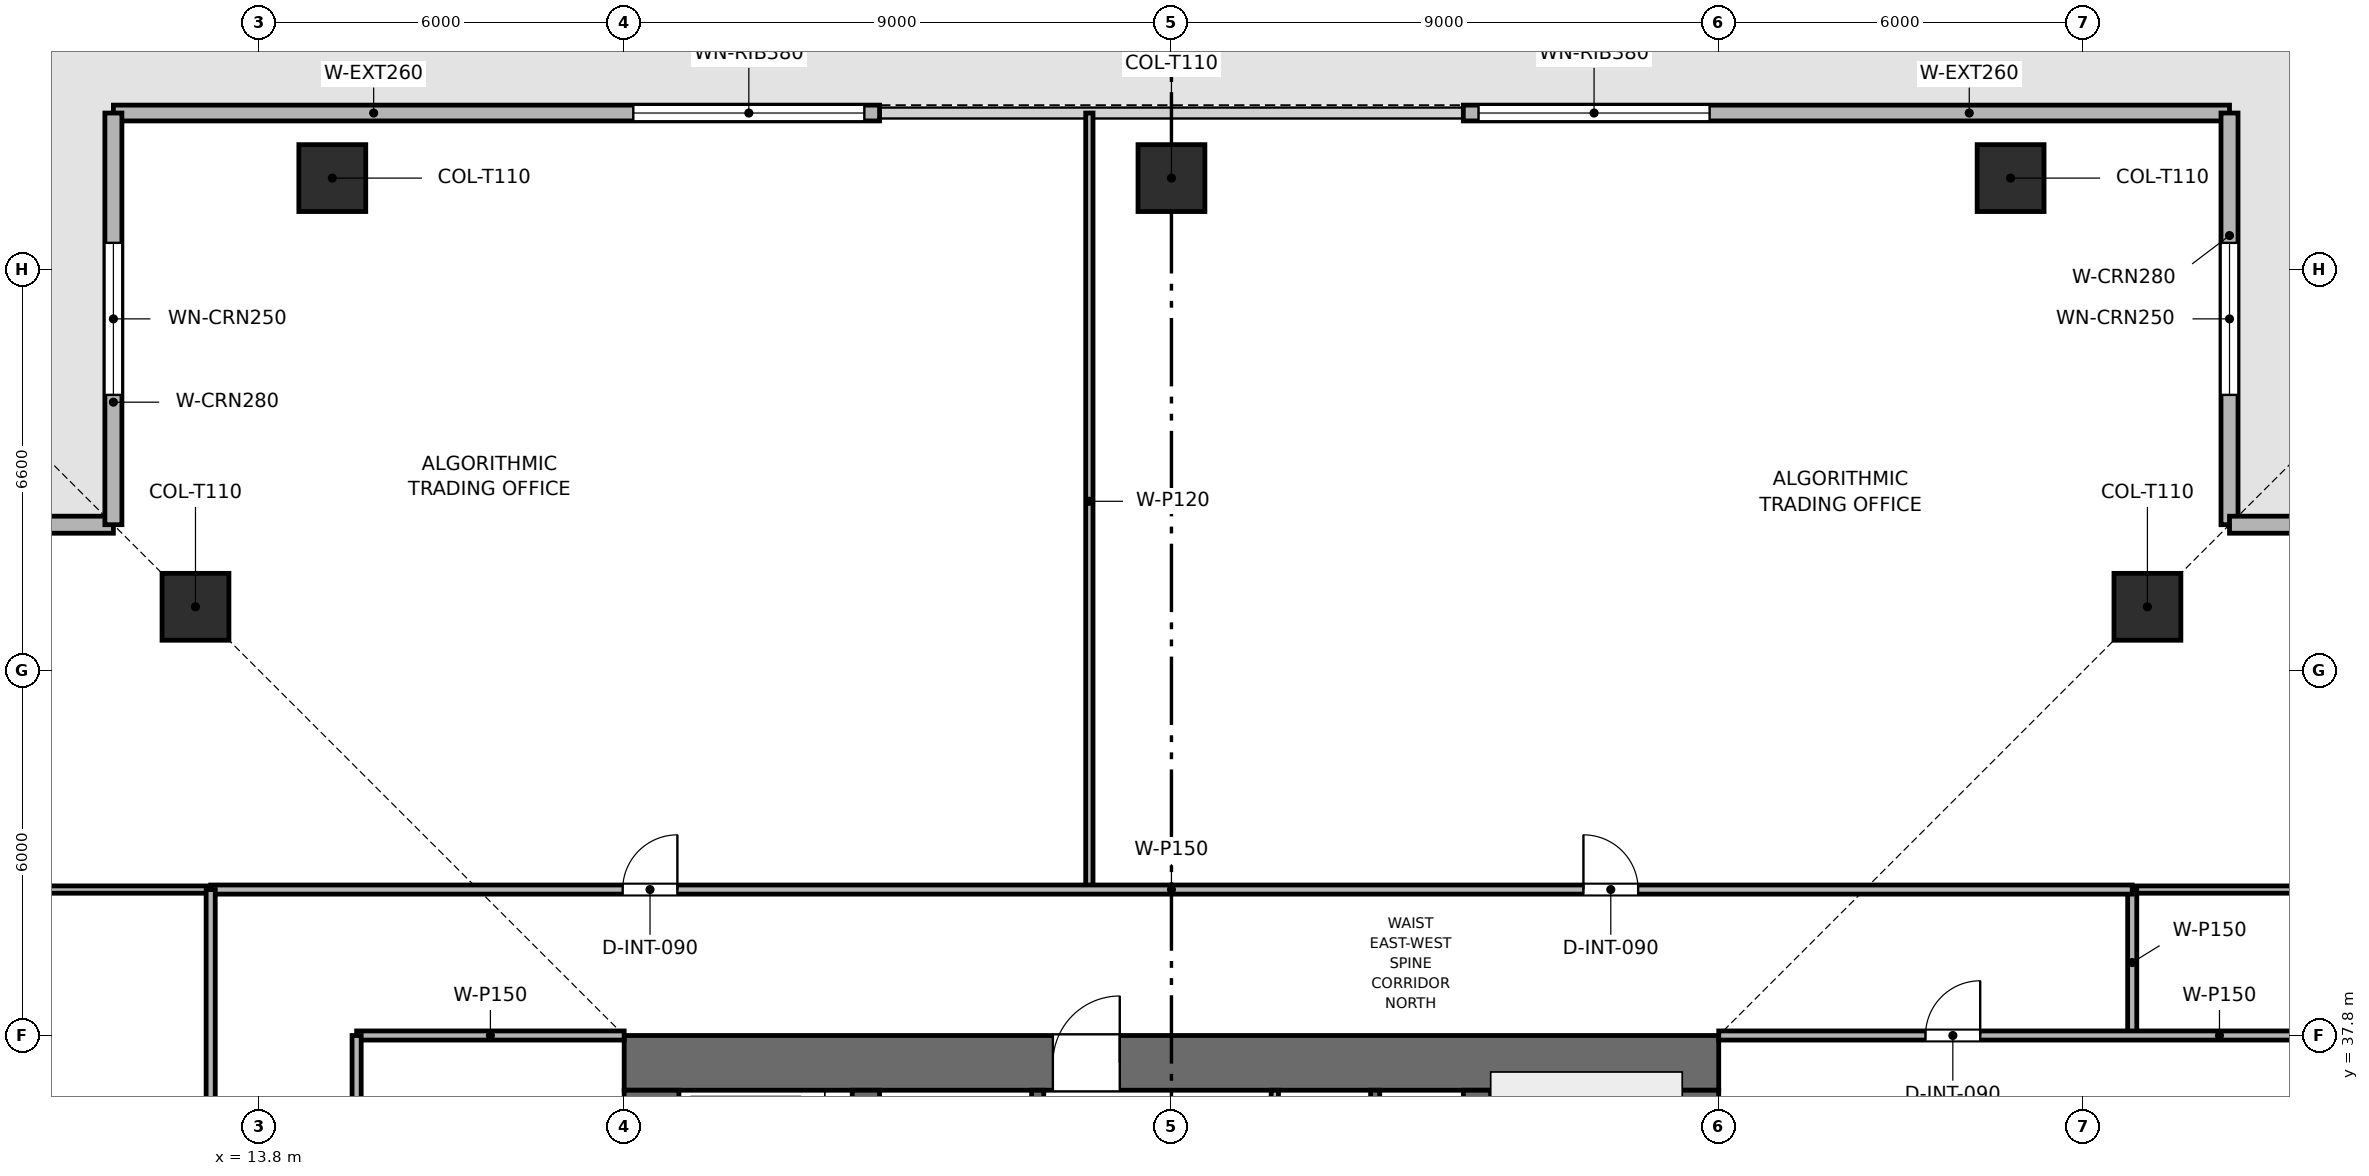
"""IFC4 building model, lengths in metres.
Left out: names, types, materials, properties, quantities, classifications, styles, units other than length and angle.
Written with IfcOpenShell. Run it as: python <this file> out.ifc"""

import sys

from ifc_helpers import new_model, si_unit, direction, frame, frame_2d, origin, origin_2d, place, context, subcontext, project, spatial, rectangle, extrude, element, fill, save


model = new_model("IFC4")
c1 = context("Model", 3, precision=1e-05, world=origin(), true_north=direction((0.0, 1.0)))
c2 = subcontext(c1, "Body", "Model", "MODEL_VIEW")
j1 = project(units=[si_unit("LENGTHUNIT", "METRE"), si_unit("PLANEANGLEUNIT", "RADIAN")], contexts=[c1])
p1 = place(None, origin())
s1 = spatial("IfcSite", under=j1, at=p1, CompositionType="ELEMENT")
p2 = place(p1, origin())
s2 = spatial("IfcBuilding", under=s1, at=p2, CompositionType="ELEMENT")
p3 = place(p2, frame((0.0, 0.0, 138.3)))
s3 = spatial("IfcBuildingStorey", under=s2, at=p3, CompositionType="ELEMENT", Elevation=138.3)
p4 = place(p3, frame((19.8, 37.35, 0.0), z_axis=(0.0, 0.0, 1.0), x_axis=(1.0, 0.0, 0.0)))
e1 = element("IfcWall", 1, at=p4, inside=s3, PredefinedType="SHEAR", context=c2, shape_type="SweptSolid", body=[
    extrude(rectangle(XDim=18.0, YDim=0.9, at=frame_2d((9.0, 0.0))), origin(), (0.0, 0.0, 1.0), 3.75),
])
p5 = place(p4, frame((7.05, 0.0, 0.0)))
e2 = element("IfcOpeningElement", 2, at=p5, cuts=e1, PredefinedType="OPENING", context=c2, shape_type="SweptSolid", body=[
    extrude(rectangle(XDim=1.1, YDim=2.15, at=frame_2d((0.55, 1.075))), frame((0.0, 0.46, 0.0), z_axis=(0.0, -1.0, 0.0), x_axis=(1.0, 0.0, 0.0)), (0.0, 0.0, 1.0), 0.92),
])
p6 = place(p3, frame((20.25, 20.7, 0.0), z_axis=(0.0, 0.0, 1.0), x_axis=(0.0, 1.0, 0.0)))
e3 = element("IfcWall", 3, at=p6, inside=s3, PredefinedType="SHEAR", context=c2, shape_type="SweptSolid", body=[
    extrude(rectangle(XDim=16.2, YDim=0.9, at=frame_2d((8.1, 0.0))), origin(), (0.0, 0.0, 1.0), 3.75),
])
p7 = place(p6, frame((10.1, 0.0, 0.0)))
e4 = element("IfcOpeningElement", 4, at=p7, cuts=e3, PredefinedType="OPENING", context=c2, shape_type="SweptSolid", body=[
    extrude(rectangle(XDim=1.1, YDim=2.15, at=frame_2d((0.55, 1.075))), frame((0.0, 0.46, 0.0), z_axis=(0.0, -1.0, 0.0), x_axis=(1.0, 0.0, 0.0)), (0.0, 0.0, 1.0), 0.92),
])
p8 = place(p3, frame((37.35, 20.7, 0.0), z_axis=(0.0, 0.0, 1.0), x_axis=(0.0, 1.0, 0.0)))
e5 = element("IfcWall", 5, at=p8, inside=s3, PredefinedType="SHEAR", context=c2, shape_type="SweptSolid", body=[
    extrude(rectangle(XDim=16.2, YDim=0.9, at=frame_2d((8.1, 0.0))), origin(), (0.0, 0.0, 1.0), 3.75),
])
p9 = place(p8, frame((4.6, 0.0, 0.0)))
e6 = element("IfcOpeningElement", 6, at=p9, cuts=e5, PredefinedType="OPENING", context=c2, shape_type="SweptSolid", body=[
    extrude(rectangle(XDim=1.1, YDim=2.15, at=frame_2d((0.55, 1.075))), frame((0.0, 0.46, 0.0), z_axis=(0.0, -1.0, 0.0), x_axis=(1.0, 0.0, 0.0)), (0.0, 0.0, 1.0), 0.92),
])
for number, where, z_axis, x_axis in (
    (7, (23.775, 20.7, 0.0), (0.0, 0.0, 1.0), (0.0, 1.0, 0.0)),
    (8, (33.825, 20.7, 0.0), (0.0, 0.0, 1.0), (0.0, 1.0, 0.0)),
):
    element("IfcWall", number, at=place(p3, frame(where, z_axis=z_axis, x_axis=x_axis)), inside=s3, PredefinedType="SHEAR", context=c2, shape_type="SweptSolid", body=[
        extrude(rectangle(XDim=16.2, YDim=0.45, at=frame_2d((8.1, 0.0))), origin(), (0.0, 0.0, 1.0), 3.75),
    ])
for number, where, z_axis, x_axis in (
    (9, (42.6, 51.9, 0.003), (0.0, 0.0, 1.0), (1.0, 0.0, 0.0)),
    (10, (28.8, 51.9, 0.003), (0.0, 0.0, 1.0), (1.0, 0.0, 0.0)),
    (11, (15.0, 51.9, 0.003), (0.0, 0.0, 1.0), (1.0, 0.0, 0.0)),
    (12, (44.85, 44.85, 0.003), (0.0, 0.0, 1.0), (1.0, 0.0, 0.0)),
    (13, (12.75, 44.85, 0.003), (0.0, 0.0, 1.0), (1.0, 0.0, 0.0)),
):
    element("IfcColumn", number, at=place(p3, frame(where, z_axis=z_axis, x_axis=x_axis)), inside=s3, PredefinedType="COLUMN", context=c2, shape_type="SweptSolid", body=[
        extrude(rectangle(XDim=1.1, YDim=1.1, at=origin_2d()), origin(), (0.0, 0.0, 1.0), 3.489),
    ])
p10 = place(p3, frame((11.4, 52.97, 0.0), z_axis=(0.0, 0.0, 1.0), x_axis=(1.0, 0.0, 0.0)))
e14 = element("IfcWall", 14, at=p10, inside=s3, PredefinedType="SOLIDWALL", context=c2, shape_type="SweptSolid", body=[
    extrude(rectangle(XDim=12.6, YDim=0.26, at=frame_2d((6.3, 0.0))), origin(), (0.0, 0.0, 1.0), 3.495),
])
p11 = place(p10, frame((8.55, 0.0, 0.9)))
e15 = element("IfcOpeningElement", 15, at=p11, cuts=e14, PredefinedType="OPENING", context=c2, shape_type="SweptSolid", body=[
    extrude(rectangle(XDim=3.8, YDim=1.9, at=frame_2d((1.9, 0.95))), frame((0.0, 0.14, 0.0), z_axis=(0.0, -1.0, 0.0), x_axis=(1.0, 0.0, 0.0)), (0.0, 0.0, 1.0), 0.28),
])
p12 = place(p3, frame((33.6, 52.97, 0.0), z_axis=(0.0, 0.0, 1.0), x_axis=(1.0, 0.0, 0.0)))
e16 = element("IfcWall", 16, at=p12, inside=s3, PredefinedType="SOLIDWALL", context=c2, shape_type="SweptSolid", body=[
    extrude(rectangle(XDim=12.6, YDim=0.26, at=frame_2d((6.3, 0.0))), origin(), (0.0, 0.0, 1.0), 3.495),
])
p13 = place(p12, frame((0.25, 0.0, 0.9)))
e17 = element("IfcOpeningElement", 17, at=p13, cuts=e16, PredefinedType="OPENING", context=c2, shape_type="SweptSolid", body=[
    extrude(rectangle(XDim=3.8, YDim=1.9, at=frame_2d((1.9, 0.95))), frame((0.0, 0.14, 0.0), z_axis=(0.0, -1.0, 0.0), x_axis=(1.0, 0.0, 0.0)), (0.0, 0.0, 1.0), 0.28),
])
p14 = place(p3, frame((4.63, 46.2, 0.0), z_axis=(0.0, 0.0, 1.0), x_axis=(1.0, 0.0, 0.0)))
e18 = element("IfcWall", 18, at=p14, inside=s3, PredefinedType="SOLIDWALL", context=c2, shape_type="SweptSolid", body=[
    extrude(rectangle(XDim=6.77, YDim=0.28, at=frame_2d((3.385, 0.0))), origin(), (0.0, 0.0, 1.0), 3.495),
])
p15 = place(p14, frame((2.135, 0.0, 0.9)))
e19 = element("IfcOpeningElement", 19, at=p15, cuts=e18, PredefinedType="OPENING", context=c2, shape_type="SweptSolid", body=[
    extrude(rectangle(XDim=2.5, YDim=1.9, at=frame_2d((1.25, 0.95))), frame((0.0, 0.15, 0.0), z_axis=(0.0, -1.0, 0.0), x_axis=(1.0, 0.0, 0.0)), (0.0, 0.0, 1.0), 0.3),
])
p16 = place(p3, frame((11.4, 46.2, 0.0), z_axis=(0.0, 0.0, 1.0), x_axis=(0.0, 1.0, 0.0)))
e20 = element("IfcWall", 20, at=p16, inside=s3, PredefinedType="SOLIDWALL", context=c2, shape_type="SweptSolid", body=[
    extrude(rectangle(XDim=6.77, YDim=0.28, at=frame_2d((3.385, 0.0))), origin(), (0.0, 0.0, 1.0), 3.495),
])
p17 = place(p16, frame((2.135, 0.0, 0.9)))
e21 = element("IfcOpeningElement", 21, at=p17, cuts=e20, PredefinedType="OPENING", context=c2, shape_type="SweptSolid", body=[
    extrude(rectangle(XDim=2.5, YDim=1.9, at=frame_2d((1.25, 0.95))), frame((0.0, 0.15, 0.0), z_axis=(0.0, -1.0, 0.0), x_axis=(1.0, 0.0, 0.0)), (0.0, 0.0, 1.0), 0.3),
])
p18 = place(p3, frame((46.2, 52.97, 0.0), z_axis=(0.0, 0.0, 1.0), x_axis=(0.0, -1.0, 0.0)))
e22 = element("IfcWall", 22, at=p18, inside=s3, PredefinedType="SOLIDWALL", context=c2, shape_type="SweptSolid", body=[
    extrude(rectangle(XDim=6.77, YDim=0.28, at=frame_2d((3.385, 0.0))), origin(), (0.0, 0.0, 1.0), 3.495),
])
p19 = place(p18, frame((2.135, 0.0, 0.9)))
e23 = element("IfcOpeningElement", 23, at=p19, cuts=e22, PredefinedType="OPENING", context=c2, shape_type="SweptSolid", body=[
    extrude(rectangle(XDim=2.5, YDim=1.9, at=frame_2d((1.25, 0.95))), frame((0.0, 0.15, 0.0), z_axis=(0.0, -1.0, 0.0), x_axis=(1.0, 0.0, 0.0)), (0.0, 0.0, 1.0), 0.3),
])
p20 = place(p3, frame((46.2, 46.2, 0.0), z_axis=(0.0, 0.0, 1.0), x_axis=(1.0, 0.0, 0.0)))
e24 = element("IfcWall", 24, at=p20, inside=s3, PredefinedType="SOLIDWALL", context=c2, shape_type="SweptSolid", body=[
    extrude(rectangle(XDim=6.77, YDim=0.28, at=frame_2d((3.385, 0.0))), origin(), (0.0, 0.0, 1.0), 3.495),
])
p21 = place(p20, frame((2.135, 0.0, 0.9)))
e25 = element("IfcOpeningElement", 25, at=p21, cuts=e24, PredefinedType="OPENING", context=c2, shape_type="SweptSolid", body=[
    extrude(rectangle(XDim=2.5, YDim=1.9, at=frame_2d((1.25, 0.95))), frame((0.0, 0.15, 0.0), z_axis=(0.0, -1.0, 0.0), x_axis=(1.0, 0.0, 0.0)), (0.0, 0.0, 1.0), 0.3),
])
p22 = place(p3, frame((32.15, 34.0, 0.0), z_axis=(0.0, 0.0, 1.0), x_axis=(0.0, 1.0, 0.0)))
e26 = element("IfcWall", 26, at=p22, inside=s3, PredefinedType="SHEAR", context=c2, shape_type="SweptSolid", body=[
    extrude(rectangle(XDim=2.9, YDim=0.15, at=frame_2d((1.45, 0.0))), origin(), (0.0, 0.0, 1.0), 3.495),
])
p23 = place(p3, frame((26.6, 34.0, 0.0), z_axis=(0.0, 0.0, 1.0), x_axis=(0.0, 1.0, 0.0)))
e27 = element("IfcWall", 27, at=p23, inside=s3, PredefinedType="SHEAR", context=c2, shape_type="SweptSolid", body=[
    extrude(rectangle(XDim=2.9, YDim=0.2, at=frame_2d((1.45, 0.0))), origin(), (0.0, 0.0, 1.0), 3.495),
])
p24 = place(p23, frame((0.75, 0.0, 0.0)))
e28 = element("IfcOpeningElement", 28, at=p24, cuts=e27, PredefinedType="OPENING", context=c2, shape_type="SweptSolid", body=[
    extrude(rectangle(XDim=1.1, YDim=2.15, at=frame_2d((0.55, 1.075))), frame((0.0, 0.11, 0.0), z_axis=(0.0, -1.0, 0.0), x_axis=(1.0, 0.0, 0.0)), (0.0, 0.0, 1.0), 0.22),
])
p25 = place(p3, frame((30.5, 33.925, 0.0), z_axis=(0.0, 0.0, 1.0), x_axis=(0.0, 1.0, 0.0)))
e29 = element("IfcWall", 29, at=p25, inside=s3, PredefinedType="PARTITIONING", context=c2, shape_type="SweptSolid", body=[
    extrude(rectangle(XDim=2.975, YDim=0.12, at=frame_2d((1.487, 0.0))), origin(), (0.0, 0.0, 1.0), 3.495),
])
p26 = place(p25, frame((0.85, 0.0, 0.0)))
e30 = element("IfcOpeningElement", 30, at=p26, cuts=e29, PredefinedType="OPENING", context=c2, shape_type="SweptSolid", body=[
    extrude(rectangle(XDim=0.9, YDim=2.1, at=frame_2d((0.45, 1.05))), frame((0.0, 0.07, 0.0), z_axis=(0.0, -1.0, 0.0), x_axis=(1.0, 0.0, 0.0)), (0.0, 0.0, 1.0), 0.14),
])
p27 = place(p3, frame((15.4, 37.8, 0.0), z_axis=(0.0, 0.0, 1.0), x_axis=(1.0, 0.0, 0.0)))
e31 = element("IfcWall", 31, at=p27, inside=s3, PredefinedType="PARTITIONING", context=c2, shape_type="SweptSolid", body=[
    extrude(rectangle(XDim=4.4, YDim=0.15, at=frame_2d((2.2, 0.0))), origin(), (0.0, 0.0, 1.0), 3.03),
])
p28 = place(p3, frame((15.4, 32.45, 0.0), z_axis=(0.0, 0.0, 1.0), x_axis=(0.0, 1.0, 0.0)))
e32 = element("IfcWall", 32, at=p28, inside=s3, PredefinedType="PARTITIONING", context=c2, shape_type="SweptSolid", body=[
    extrude(rectangle(XDim=5.35, YDim=0.15, at=frame_2d((2.675, 0.0))), origin(), (0.0, 0.0, 1.0), 3.03),
])
p29 = place(p28, frame((2.1, 0.0, 0.0)))
e33 = element("IfcOpeningElement", 33, at=p29, cuts=e32, PredefinedType="OPENING", context=c2, shape_type="SweptSolid", body=[
    extrude(rectangle(XDim=0.9, YDim=2.1, at=frame_2d((0.45, 1.05))), frame((0.0, 0.085, 0.0), z_axis=(0.0, -1.0, 0.0), x_axis=(1.0, 0.0, 0.0)), (0.0, 0.0, 1.0), 0.17),
])
p30 = place(p3, frame((27.45, 40.2, 0.0), z_axis=(0.0, 0.0, 1.0), x_axis=(0.0, 1.0, 0.0)))
e34 = element("IfcWall", 34, at=p30, inside=s3, PredefinedType="PARTITIONING", context=c2, shape_type="SweptSolid", body=[
    extrude(rectangle(XDim=12.77, YDim=0.12, at=frame_2d((6.385, 0.0))), origin(), (0.0, 0.0, 1.0), 2.98),
])
p31 = place(p3, frame((4.63, 40.2, 0.0), z_axis=(0.0, 0.0, 1.0), x_axis=(1.0, 0.0, 0.0)))
e35 = element("IfcWall", 35, at=p31, inside=s3, PredefinedType="PARTITIONING", context=c2, shape_type="SweptSolid", body=[
    extrude(rectangle(XDim=8.37, YDim=0.12, at=frame_2d((4.185, 0.0))), origin(), (0.0, 0.0, 1.0), 2.98),
])
p32 = place(p3, frame((44.6, 40.2, 0.0), z_axis=(0.0, 0.0, 1.0), x_axis=(1.0, 0.0, 0.0)))
e36 = element("IfcWall", 36, at=p32, inside=s3, PredefinedType="PARTITIONING", context=c2, shape_type="SweptSolid", body=[
    extrude(rectangle(XDim=8.37, YDim=0.12, at=frame_2d((4.185, 0.0))), origin(), (0.0, 0.0, 1.0), 2.98),
])
p33 = place(p3, frame((44.6, 37.8, 0.0), z_axis=(0.0, 0.0, 1.0), x_axis=(0.0, 1.0, 0.0)))
e37 = element("IfcWall", 37, at=p33, inside=s3, PredefinedType="PARTITIONING", context=c2, shape_type="SweptSolid", body=[
    extrude(rectangle(XDim=2.4, YDim=0.15, at=frame_2d((1.2, 0.0))), origin(), (0.0, 0.0, 1.0), 3.495),
])
p34 = place(p3, frame((37.8, 37.8, 0.0), z_axis=(0.0, 0.0, 1.0), x_axis=(1.0, 0.0, 0.0)))
e38 = element("IfcWall", 38, at=p34, inside=s3, PredefinedType="PARTITIONING", context=c2, shape_type="SweptSolid", body=[
    extrude(rectangle(XDim=15.17, YDim=0.15, at=frame_2d((7.585, 0.0))), origin(), (0.0, 0.0, 1.0), 2.98),
])
p35 = place(p34, frame((3.4, 0.0, 0.0)))
e39 = element("IfcOpeningElement", 39, at=p35, cuts=e38, PredefinedType="OPENING", context=c2, shape_type="SweptSolid", body=[
    extrude(rectangle(XDim=0.9, YDim=2.1, at=frame_2d((0.45, 1.05))), frame((0.0, 0.085, 0.0), z_axis=(0.0, -1.0, 0.0), x_axis=(1.0, 0.0, 0.0)), (0.0, 0.0, 1.0), 0.17),
])
p36 = place(p3, frame((13.0, 40.2, 0.0), z_axis=(0.0, 0.0, 1.0), x_axis=(1.0, 0.0, 0.0)))
e40 = element("IfcWall", 40, at=p36, inside=s3, PredefinedType="PARTITIONING", context=c2, shape_type="SweptSolid", body=[
    extrude(rectangle(XDim=31.6, YDim=0.15, at=frame_2d((15.8, 0.0))), origin(), (0.0, 0.0, 1.0), 3.03),
])
p37 = place(p36, frame((6.775, 0.0, 0.0)))
e41 = element("IfcOpeningElement", 41, at=p37, cuts=e40, PredefinedType="OPENING", context=c2, shape_type="SweptSolid", body=[
    extrude(rectangle(XDim=0.9, YDim=2.1, at=frame_2d((0.45, 1.05))), frame((0.0, 0.085, 0.0), z_axis=(0.0, -1.0, 0.0), x_axis=(1.0, 0.0, 0.0)), (0.0, 0.0, 1.0), 0.17),
])
p38 = place(p36, frame((22.575, 0.0, 0.0)))
e42 = element("IfcOpeningElement", 42, at=p38, cuts=e40, PredefinedType="OPENING", context=c2, shape_type="SweptSolid", body=[
    extrude(rectangle(XDim=0.9, YDim=2.1, at=frame_2d((0.45, 1.05))), frame((0.0, 0.085, 0.0), z_axis=(0.0, -1.0, 0.0), x_axis=(1.0, 0.0, 0.0)), (0.0, 0.0, 1.0), 0.17),
])
p39 = place(p3, frame((13.0, 17.4, 0.0), z_axis=(0.0, 0.0, 1.0), x_axis=(0.0, 1.0, 0.0)))
e43 = element("IfcWall", 43, at=p39, inside=s3, PredefinedType="PARTITIONING", context=c2, shape_type="SweptSolid", body=[
    extrude(rectangle(XDim=22.8, YDim=0.15, at=frame_2d((11.4, 0.0))), origin(), (0.0, 0.0, 1.0), 3.03),
])
p40 = place(p39, frame((10.95, 0.0, 0.0)))
e44 = element("IfcOpeningElement", 44, at=p40, cuts=e43, PredefinedType="OPENING", context=c2, shape_type="SweptSolid", body=[
    extrude(rectangle(XDim=0.9, YDim=2.1, at=frame_2d((0.45, 1.05))), frame((0.0, 0.085, 0.0), z_axis=(0.0, -1.0, 0.0), x_axis=(1.0, 0.0, 0.0)), (0.0, 0.0, 1.0), 0.17),
])
p41 = place(p11, origin())
e45 = element("IfcWindow", 45, at=p41, inside=s3, PartitioningType="SINGLE_PANEL", PredefinedType="WINDOW", context=c2, shape_type="SweptSolid", body=[
    extrude(rectangle(XDim=3.8, YDim=1.9, at=frame_2d((1.9, 0.95))), frame((0.0, 0.03, 0.0), z_axis=(0.0, -1.0, 0.0), x_axis=(1.0, 0.0, 0.0)), (0.0, 0.0, 1.0), 0.06),
])
fill(e15, e45)
p42 = place(p13, origin())
e46 = element("IfcWindow", 46, at=p42, inside=s3, PartitioningType="SINGLE_PANEL", PredefinedType="WINDOW", context=c2, shape_type="SweptSolid", body=[
    extrude(rectangle(XDim=3.8, YDim=1.9, at=frame_2d((1.9, 0.95))), frame((0.0, 0.03, 0.0), z_axis=(0.0, -1.0, 0.0), x_axis=(1.0, 0.0, 0.0)), (0.0, 0.0, 1.0), 0.06),
])
fill(e17, e46)
p43 = place(p17, origin())
e47 = element("IfcWindow", 47, at=p43, inside=s3, PartitioningType="SINGLE_PANEL", PredefinedType="WINDOW", context=c2, shape_type="SweptSolid", body=[
    extrude(rectangle(XDim=2.5, YDim=1.9, at=frame_2d((1.25, 0.95))), frame((0.0, 0.03, 0.0), z_axis=(0.0, -1.0, 0.0), x_axis=(1.0, 0.0, 0.0)), (0.0, 0.0, 1.0), 0.06),
])
fill(e21, e47)
p44 = place(p19, origin())
e48 = element("IfcWindow", 48, at=p44, inside=s3, PartitioningType="SINGLE_PANEL", PredefinedType="WINDOW", context=c2, shape_type="SweptSolid", body=[
    extrude(rectangle(XDim=2.5, YDim=1.9, at=frame_2d((1.25, 0.95))), frame((0.0, 0.03, 0.0), z_axis=(0.0, -1.0, 0.0), x_axis=(1.0, 0.0, 0.0)), (0.0, 0.0, 1.0), 0.06),
])
fill(e23, e48)
p45 = place(p35, origin())
e49 = element("IfcDoor", 49, at=p45, inside=s3, OperationType="SINGLE_SWING_RIGHT", PredefinedType="DOOR", context=c2, shape_type="SweptSolid", body=[
    extrude(rectangle(XDim=0.9, YDim=2.1, at=frame_2d((0.45, 1.05))), frame((0.0, 0.025, 0.0), z_axis=(0.0, -1.0, 0.0), x_axis=(1.0, 0.0, 0.0)), (0.0, 0.0, 1.0), 0.05),
])
fill(e39, e49)
p46 = place(p37, origin())
e50 = element("IfcDoor", 50, at=p46, inside=s3, OperationType="SINGLE_SWING_RIGHT", PredefinedType="DOOR", context=c2, shape_type="SweptSolid", body=[
    extrude(rectangle(XDim=0.9, YDim=2.1, at=frame_2d((0.45, 1.05))), frame((0.0, 0.025, 0.0), z_axis=(0.0, -1.0, 0.0), x_axis=(1.0, 0.0, 0.0)), (0.0, 0.0, 1.0), 0.05),
])
fill(e41, e50)
p47 = place(p38, origin())
e51 = element("IfcDoor", 51, at=p47, inside=s3, OperationType="SINGLE_SWING_LEFT", PredefinedType="DOOR", context=c2, shape_type="SweptSolid", body=[
    extrude(rectangle(XDim=0.9, YDim=2.1, at=frame_2d((0.45, 1.05))), frame((0.0, 0.025, 0.0), z_axis=(0.0, -1.0, 0.0), x_axis=(1.0, 0.0, 0.0)), (0.0, 0.0, 1.0), 0.05),
])
fill(e42, e51)
p48 = place(p5, origin())
e52 = element("IfcDoor", 52, at=p48, inside=s3, OperationType="SINGLE_SWING_RIGHT", PredefinedType="DOOR", context=c2, shape_type="SweptSolid", body=[
    extrude(rectangle(XDim=1.1, YDim=2.15, at=frame_2d((0.55, 1.075))), frame((0.0, 0.025, 0.0), z_axis=(0.0, -1.0, 0.0), x_axis=(1.0, 0.0, 0.0)), (0.0, 0.0, 1.0), 0.05),
])
fill(e2, e52)
save(model, sys.argv[1])
